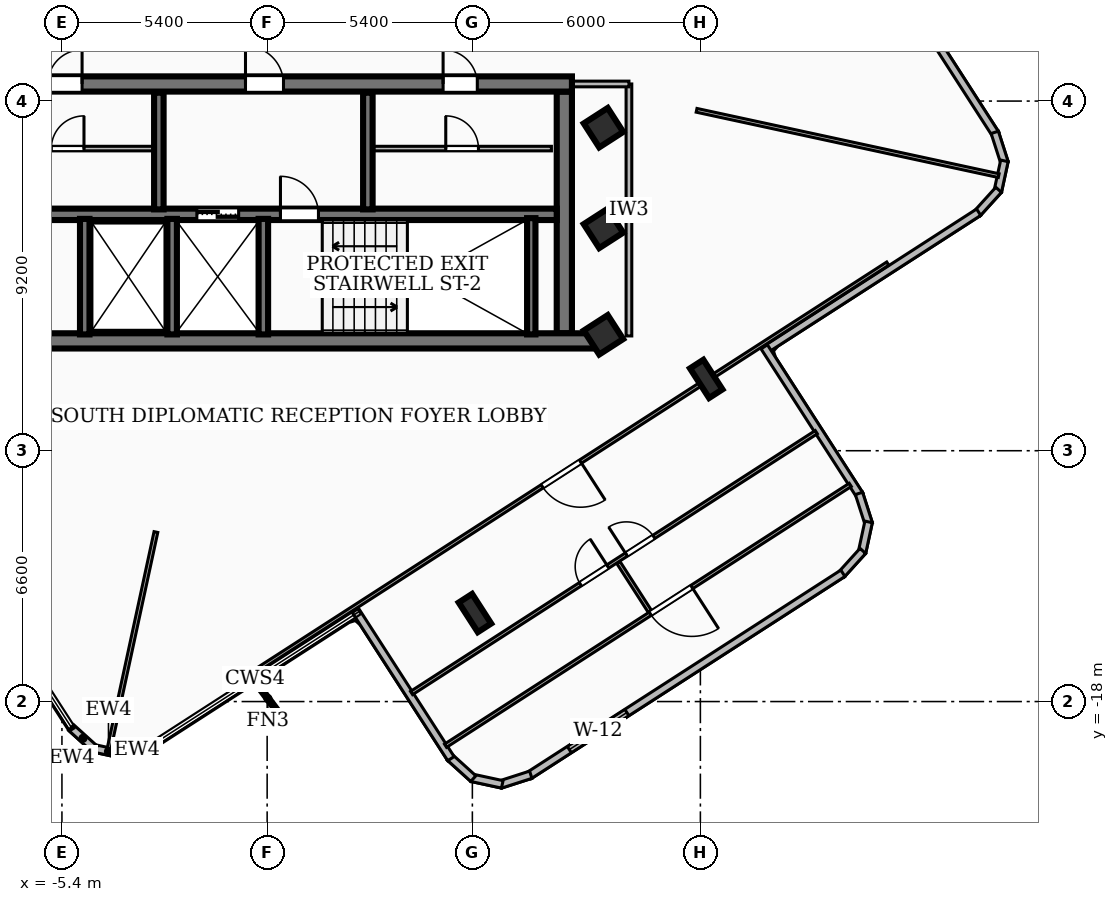
"""IFC4 building model, lengths in metres.
Left out: names, types, materials, properties, quantities, classifications, styles, units other than length and angle.
Written with IfcOpenShell. Run it as: python <this file> out.ifc"""

import sys

from ifc_helpers import new_model, si_unit, direction, frame, frame_2d, origin, origin_2d, place, context, subcontext, project, spatial, rectangle, i_section, extrude, element, fill, save


model = new_model("IFC4")
c1 = context("Model", 3, precision=1e-05, world=origin(), true_north=direction((0.0, 1.0)))
c2 = subcontext(c1, "Body", "Model", "MODEL_VIEW")
j1 = project(units=[si_unit("LENGTHUNIT", "METRE"), si_unit("PLANEANGLEUNIT", "RADIAN")], contexts=[c1])
p1 = place(None, origin())
s1 = spatial("IfcSite", under=j1, at=p1, CompositionType="ELEMENT")
p2 = place(p1, origin())
s2 = spatial("IfcBuilding", under=s1, at=p2, CompositionType="ELEMENT")
p3 = place(p2, frame((0.0, 0.0, 215.46)))
s3 = spatial("IfcBuildingStorey", under=s2, at=p3, CompositionType="ELEMENT", Elevation=215.46)
p4 = place(p3, frame((8.78, -8.51, 0.0), z_axis=(0.0, 0.0, 1.0), x_axis=(-1.0, 0.0, 0.0)))
e1 = element("IfcWall", 1, at=p4, inside=s3, PredefinedType="SHEAR", context=c2, shape_type="SweptSolid", body=[
    extrude(rectangle(XDim=17.56, YDim=0.4, at=frame_2d((8.78, 0.0))), origin(), (0.0, 0.0, 1.0), 3.16),
])
p5 = place(p3, frame((-8.02, -1.75, 0.0), z_axis=(0.0, 0.0, 1.0), x_axis=(1.0, 0.0, 0.0)))
e2 = element("IfcWall", 2, at=p5, inside=s3, PredefinedType="SHEAR", context=c2, shape_type="SweptSolid", body=[
    extrude(rectangle(XDim=16.04, YDim=0.4, at=frame_2d((8.02, 0.0))), origin(), (0.0, 0.0, 1.0), 3.16),
])
p6 = place(p5, frame((7.45, 0.0, 0.0)))
e3 = element("IfcOpeningElement", 3, at=p6, cuts=e2, PredefinedType="OPENING", context=c2, shape_type="SweptSolid", body=[
    extrude(rectangle(XDim=1.0, YDim=2.1, at=frame_2d((0.5, 1.05))), frame((0.0, 0.21, 0.0), z_axis=(0.0, -1.0, 0.0), x_axis=(1.0, 0.0, 0.0)), (0.0, 0.0, 1.0), 0.42),
])
p7 = place(p5, frame((12.65, 0.0, 0.0)))
e4 = element("IfcOpeningElement", 4, at=p7, cuts=e2, PredefinedType="OPENING", context=c2, shape_type="SweptSolid", body=[
    extrude(rectangle(XDim=0.9, YDim=2.06, at=frame_2d((0.45, 1.03))), frame((0.0, 0.21, 0.0), z_axis=(0.0, -1.0, 0.0), x_axis=(1.0, 0.0, 0.0)), (0.0, 0.0, 1.0), 0.42),
])
p8 = place(p5, frame((2.25, 0.0, 0.0)))
e5 = element("IfcOpeningElement", 5, at=p8, cuts=e2, PredefinedType="OPENING", context=c2, shape_type="SweptSolid", body=[
    extrude(rectangle(XDim=0.9, YDim=2.06, at=frame_2d((0.45, 1.03))), frame((0.0, 0.21, 0.0), z_axis=(0.0, -1.0, 0.0), x_axis=(1.0, 0.0, 0.0)), (0.0, 0.0, 1.0), 0.42),
])
p9 = place(p3, frame((7.82, -1.95, 0.0), z_axis=(0.0, 0.0, 1.0), x_axis=(0.0, -1.0, 0.0)))
e6 = element("IfcWall", 6, at=p9, inside=s3, PredefinedType="SHEAR", context=c2, shape_type="SweptSolid", body=[
    extrude(rectangle(XDim=6.36, YDim=0.4, at=frame_2d((3.18, 0.0))), origin(), (0.0, 0.0, 1.0), 3.16),
])
p10 = place(p3, frame((-7.62, -5.18, 0.0), z_axis=(0.0, 0.0, 1.0), x_axis=(1.0, 0.0, 0.0)))
e7 = element("IfcWall", 7, at=p10, inside=s3, PredefinedType="SOLIDWALL", context=c2, shape_type="SweptSolid", body=[
    extrude(rectangle(XDim=15.24, YDim=0.3, at=frame_2d((7.62, 0.0))), origin(), (0.0, 0.0, 1.0), 3.16),
])
p11 = place(p10, frame((5.77, 0.0, 0.0)))
e8 = element("IfcOpeningElement", 8, at=p11, cuts=e7, PredefinedType="OPENING", context=c2, shape_type="SweptSolid", body=[
    extrude(rectangle(XDim=1.1, YDim=2.15, at=frame_2d((0.55, 1.075))), frame((0.0, 0.16, 0.0), z_axis=(0.0, -1.0, 0.0), x_axis=(1.0, 0.0, 0.0)), (0.0, 0.0, 1.0), 0.32),
])
p12 = place(p10, frame((7.97, 0.0, 0.0)))
e9 = element("IfcOpeningElement", 9, at=p12, cuts=e7, PredefinedType="OPENING", context=c2, shape_type="SweptSolid", body=[
    extrude(rectangle(XDim=1.0, YDim=2.1, at=frame_2d((0.5, 1.05))), frame((0.0, 0.16, 0.0), z_axis=(0.0, -1.0, 0.0), x_axis=(1.0, 0.0, 0.0)), (0.0, 0.0, 1.0), 0.32),
])
p13 = place(p3, frame((6.95, -8.34, 0.0), z_axis=(0.0, 0.0, 1.0), x_axis=(0.0, 1.0, 0.0)))
e10 = element("IfcWall", 10, at=p13, inside=s3, PredefinedType="SOLIDWALL", context=c2, shape_type="SweptSolid", body=[
    extrude(rectangle(XDim=3.06, YDim=0.22, at=frame_2d((1.53, 0.0))), origin(), (0.0, 0.0, 1.0), 3.16),
])
for number, where, z_axis, x_axis in (
    (11, (-0.1, -8.34, 0.0), (0.0, 0.0, 1.0), (0.0, 1.0, 0.0)),
    (12, (-2.5, -8.34, 0.0), (0.0, 0.0, 1.0), (0.0, 1.0, 0.0)),
    (13, (-4.8, -8.34, 0.0), (0.0, 0.0, 1.0), (0.0, 1.0, 0.0)),
):
    element("IfcWall", number, at=place(p3, frame(where, z_axis=z_axis, x_axis=x_axis)), inside=s3, PredefinedType="SOLIDWALL", context=c2, shape_type="SweptSolid", body=[
        extrude(rectangle(XDim=3.04, YDim=0.25, at=frame_2d((1.52, 0.0))), origin(), (0.0, 0.0, 1.0), 3.16),
    ])
for number, where, z_axis, x_axis in (
    (14, (-2.85, -5.05, 0.0), (0.0, 0.0, 1.0), (0.0, 1.0, 0.0)),
    (15, (2.65, -5.05, 0.0), (0.0, 0.0, 1.0), (0.0, 1.0, 0.0)),
):
    element("IfcWall", number, at=place(p3, frame(where, z_axis=z_axis, x_axis=x_axis)), inside=s3, PredefinedType="SOLIDWALL", context=c2, shape_type="SweptSolid", body=[
        extrude(rectangle(XDim=3.07, YDim=0.25, at=frame_2d((1.535, 0.0))), origin(), (0.0, 0.0, 1.0), 3.16),
    ])
for number, where, z_axis, x_axis in (
    (16, (8.85, -5.55, 0.0), (0.0, 0.0, 1.0), (0.841, 0.542, 0.0)),
    (17, (8.85, -2.9, 0.0), (0.0, 0.0, 1.0), (0.841, 0.542, 0.0)),
    (18, (8.85, -8.35, 0.0), (0.0, 0.0, 1.0), (0.841, 0.542, 0.0)),
):
    element("IfcColumn", number, at=place(p3, frame(where, z_axis=z_axis, x_axis=x_axis)), inside=s3, PredefinedType="COLUMN", context=c2, shape_type="SweptSolid", body=[
        extrude(rectangle(XDim=0.75, YDim=0.75, at=origin_2d()), origin(), (0.0, 0.0, 1.0), 3.42),
    ])
for number, where, z_axis, x_axis in (
    (19, (5.468, -15.671, 0.0), (0.0, 0.0, 1.0), (0.841, 0.542, 0.0)),
    (20, (11.554, -9.51, 0.0), (0.0, 0.0, 1.0), (0.841, 0.542, 0.0)),
):
    element("IfcColumn", number, at=place(p3, frame(where, z_axis=z_axis, x_axis=x_axis)), inside=s3, PredefinedType="COLUMN", context=c2, shape_type="SweptSolid", body=[
        extrude(i_section(OverallWidth=0.418, OverallDepth=0.927, WebThickness=0.019, FlangeThickness=0.032, at=origin_2d()), origin(), (0.0, 0.0, 1.0), 3.42),
    ])
p14 = place(p3, frame((-3.023, -19.146, 0.0), z_axis=(0.0, 0.0, 1.0), x_axis=(-0.951837516142, -0.306602907463, 0.0)))
e21 = element("IfcWall", 21, at=p14, inside=s3, PredefinedType="SOLIDWALL", context=c2, shape_type="SweptSolid", body=[
    extrude(rectangle(XDim=0.838, YDim=0.2, at=frame_2d((0.419, 0.0))), origin(), (0.0, 0.0, 1.0), 3.16),
])
p15 = place(p3, frame((-3.773, -19.4, 0.0), z_axis=(0.0, 0.0, 1.0), x_axis=(-0.977467098281, 0.211087829535, 0.0)))
e22 = element("IfcWall", 22, at=p15, inside=s3, PredefinedType="SOLIDWALL", context=c2, shape_type="SweptSolid", body=[
    extrude(rectangle(XDim=0.823, YDim=0.2, at=frame_2d((0.412, 0.0))), origin(), (0.0, 0.0, 1.0), 3.16),
])
p16 = place(p3, frame((-4.535, -19.248, 0.0), z_axis=(0.0, 0.0, 1.0), x_axis=(-0.741439258983, 0.671019988703, 0.0)))
e23 = element("IfcWall", 23, at=p16, inside=s3, PredefinedType="SOLIDWALL", context=c2, shape_type="SweptSolid", body=[
    extrude(rectangle(XDim=0.839, YDim=0.2, at=frame_2d((0.419, 0.0))), origin(), (0.0, 0.0, 1.0), 3.16),
])
p17 = place(p3, frame((15.624, 2.431, 0.0), z_axis=(0.0, 0.0, 1.0), x_axis=(0.541715396451, -0.840561972283, 0.0)))
e24 = element("IfcWall", 24, at=p17, inside=s3, PredefinedType="SOLIDWALL", context=c2, shape_type="SweptSolid", body=[
    extrude(rectangle(XDim=6.542, YDim=0.2, at=frame_2d((3.271, 0.0))), origin(), (0.0, 0.0, 1.0), 3.16),
])
p18 = place(p3, frame((19.146, -3.023, 0.0), z_axis=(0.0, 0.0, 1.0), x_axis=(0.306602907463, -0.951837516142, 0.0)))
e25 = element("IfcWall", 25, at=p18, inside=s3, PredefinedType="SOLIDWALL", context=c2, shape_type="SweptSolid", body=[
    extrude(rectangle(XDim=0.838, YDim=0.2, at=frame_2d((0.419, 0.0))), origin(), (0.0, 0.0, 1.0), 3.16),
])
p19 = place(p3, frame((19.4, -3.773, 0.0), z_axis=(0.0, 0.0, 1.0), x_axis=(-0.211087829535, -0.977467098281, 0.0)))
e26 = element("IfcWall", 26, at=p19, inside=s3, PredefinedType="SOLIDWALL", context=c2, shape_type="SweptSolid", body=[
    extrude(rectangle(XDim=0.823, YDim=0.2, at=frame_2d((0.412, 0.0))), origin(), (0.0, 0.0, 1.0), 3.16),
])
p20 = place(p3, frame((19.248, -4.535, 0.0), z_axis=(0.0, 0.0, 1.0), x_axis=(-0.671019988703, -0.741439258983, 0.0)))
e27 = element("IfcWall", 27, at=p20, inside=s3, PredefinedType="SOLIDWALL", context=c2, shape_type="SweptSolid", body=[
    extrude(rectangle(XDim=0.839, YDim=0.2, at=frame_2d((0.419, 0.0))), origin(), (0.0, 0.0, 1.0), 3.16),
])
p21 = place(p3, frame((18.723, -5.124, 0.0), z_axis=(0.0, 0.0, 1.0), x_axis=(-0.840584959151, -0.541679726821, 0.0)))
e28 = element("IfcWall", 28, at=p21, inside=s3, PredefinedType="SOLIDWALL", context=c2, shape_type="SweptSolid", body=[
    extrude(rectangle(XDim=6.742, YDim=0.2, at=frame_2d((3.371, 0.0))), origin(), (0.0, 0.0, 1.0), 3.16),
])
p22 = place(p3, frame((13.08, -8.666, 0.0), z_axis=(0.0, 0.0, 1.0), x_axis=(0.541732711374, -0.840550813114, 0.0)))
e29 = element("IfcWall", 29, at=p22, inside=s3, PredefinedType="SOLIDWALL", context=c2, shape_type="SweptSolid", body=[
    extrude(rectangle(XDim=4.642, YDim=0.2, at=frame_2d((2.321, 0.0))), origin(), (0.0, 0.0, 1.0), 3.16),
])
p23 = place(p3, frame((15.573, -12.523, 0.0), z_axis=(0.0, 0.0, 1.0), x_axis=(0.306602907463, -0.951837516142, 0.0)))
e30 = element("IfcWall", 30, at=p23, inside=s3, PredefinedType="SOLIDWALL", context=c2, shape_type="SweptSolid", body=[
    extrude(rectangle(XDim=0.838, YDim=0.2, at=frame_2d((0.419, 0.0))), origin(), (0.0, 0.0, 1.0), 3.16),
])
p24 = place(p3, frame((15.827, -13.273, 0.0), z_axis=(0.0, 0.0, 1.0), x_axis=(-0.210782404691, -0.977533006027, 0.0)))
e31 = element("IfcWall", 31, at=p24, inside=s3, PredefinedType="SOLIDWALL", context=c2, shape_type="SweptSolid", body=[
    extrude(rectangle(XDim=0.825, YDim=0.2, at=frame_2d((0.412, 0.0))), origin(), (0.0, 0.0, 1.0), 3.16),
])
p25 = place(p3, frame((15.675, -14.036, 0.0), z_axis=(0.0, 0.0, 1.0), x_axis=(-0.671019988703, -0.741439258983, 0.0)))
e32 = element("IfcWall", 32, at=p25, inside=s3, PredefinedType="SOLIDWALL", context=c2, shape_type="SweptSolid", body=[
    extrude(rectangle(XDim=0.839, YDim=0.2, at=frame_2d((0.419, 0.0))), origin(), (0.0, 0.0, 1.0), 3.16),
])
p26 = place(p3, frame((15.15, -14.625, 0.0), z_axis=(0.0, 0.0, 1.0), x_axis=(-0.84055619882, -0.541724354839, 0.0)))
e33 = element("IfcWall", 33, at=p26, inside=s3, PredefinedType="SOLIDWALL", context=c2, shape_type="SweptSolid", body=[
    extrude(rectangle(XDim=9.824, YDim=0.2, at=frame_2d((4.912, 0.0))), origin(), (0.0, 0.0, 1.0), 3.16),
])
p27 = place(p26, frame((6.763, 0.0, 0.85)))
e34 = element("IfcOpeningElement", 34, at=p27, cuts=e33, PredefinedType="OPENING", context=c2, shape_type="SweptSolid", body=[
    extrude(rectangle(XDim=1.8, YDim=1.6, at=frame_2d((0.9, 0.8))), frame((0.0, 0.11, 0.0), z_axis=(0.0, -1.0, 0.0), x_axis=(1.0, 0.0, 0.0)), (0.0, 0.0, 1.0), 0.22),
])
p28 = place(p3, frame((6.937, -19.925, 0.0), z_axis=(0.0, 0.0, 1.0), x_axis=(-0.951922461344, -0.306339072907, 0.0)))
e35 = element("IfcWall", 35, at=p28, inside=s3, PredefinedType="SOLIDWALL", context=c2, shape_type="SweptSolid", body=[
    extrude(rectangle(XDim=0.838, YDim=0.2, at=frame_2d((0.419, 0.0))), origin(), (0.0, 0.0, 1.0), 3.16),
])
p29 = place(p3, frame((6.187, -20.179, 0.0), z_axis=(0.0, 0.0, 1.0), x_axis=(-0.977405889656, 0.211371064399, 0.0)))
e36 = element("IfcWall", 36, at=p29, inside=s3, PredefinedType="SOLIDWALL", context=c2, shape_type="SweptSolid", body=[
    extrude(rectangle(XDim=0.823, YDim=0.2, at=frame_2d((0.412, 0.0))), origin(), (0.0, 0.0, 1.0), 3.16),
])
p30 = place(p3, frame((5.425, -20.027, 0.0), z_axis=(0.0, 0.0, 1.0), x_axis=(-0.741439258983, 0.671019988703, 0.0)))
e37 = element("IfcWall", 37, at=p30, inside=s3, PredefinedType="SOLIDWALL", context=c2, shape_type="SweptSolid", body=[
    extrude(rectangle(XDim=0.839, YDim=0.2, at=frame_2d((0.419, 0.0))), origin(), (0.0, 0.0, 1.0), 3.16),
])
p31 = place(p3, frame((4.836, -19.502, 0.0), z_axis=(0.0, 0.0, 1.0), x_axis=(-0.541756659411, 0.840535378187, 0.0)))
e38 = element("IfcWall", 38, at=p31, inside=s3, PredefinedType="SOLIDWALL", context=c2, shape_type="SweptSolid", body=[
    extrude(rectangle(XDim=4.642, YDim=0.2, at=frame_2d((2.321, 0.0))), origin(), (0.0, 0.0, 1.0), 3.16),
])
p32 = place(p3, frame((2.8, -3.45, 0.0), z_axis=(0.0, 0.0, 1.0), x_axis=(1.0, 0.0, 0.0)))
e39 = element("IfcWall", 39, at=p32, inside=s3, PredefinedType="PARTITIONING", context=c2, shape_type="SweptSolid", body=[
    extrude(rectangle(XDim=4.68, YDim=0.12, at=frame_2d((2.34, 0.0))), origin(), (0.0, 0.0, 1.0), 3.16),
])
p33 = place(p32, frame((1.9, 0.0, 0.0)))
e40 = element("IfcOpeningElement", 40, at=p33, cuts=e39, PredefinedType="OPENING", context=c2, shape_type="SweptSolid", body=[
    extrude(rectangle(XDim=0.86, YDim=2.04, at=frame_2d((0.43, 1.02))), frame((0.0, 0.07, 0.0), z_axis=(0.0, -1.0, 0.0), x_axis=(1.0, 0.0, 0.0)), (0.0, 0.0, 1.0), 0.14),
])
p34 = place(p3, frame((-7.52, -3.45, 0.0), z_axis=(0.0, 0.0, 1.0), x_axis=(1.0, 0.0, 0.0)))
e41 = element("IfcWall", 41, at=p34, inside=s3, PredefinedType="PARTITIONING", context=c2, shape_type="SweptSolid", body=[
    extrude(rectangle(XDim=4.54, YDim=0.12, at=frame_2d((2.27, 0.0))), origin(), (0.0, 0.0, 1.0), 3.16),
])
p35 = place(p34, frame((1.84, 0.0, 0.0)))
e42 = element("IfcOpeningElement", 42, at=p35, cuts=e41, PredefinedType="OPENING", context=c2, shape_type="SweptSolid", body=[
    extrude(rectangle(XDim=0.86, YDim=2.04, at=frame_2d((0.43, 1.02))), frame((0.0, 0.07, 0.0), z_axis=(0.0, -1.0, 0.0), x_axis=(1.0, 0.0, 0.0)), (0.0, 0.0, 1.0), 0.14),
])
p36 = place(p3, frame((9.52, -8.38, 0.0), z_axis=(0.0, 0.0, 1.0), x_axis=(0.0, 1.0, 0.0)))
e43 = element("IfcWall", 43, at=p36, inside=s3, PredefinedType="PARTITIONING", context=c2, shape_type="SweptSolid", body=[
    extrude(rectangle(XDim=6.63, YDim=0.15, at=frame_2d((3.315, 0.0))), origin(), (0.0, 0.0, 1.0), 3.16),
])
p37 = place(p3, frame((7.85, -1.75, 0.0), z_axis=(0.0, 0.0, 1.0), x_axis=(1.0, 0.0, 0.0)))
e44 = element("IfcWall", 44, at=p37, inside=s3, PredefinedType="PARTITIONING", context=c2, shape_type="SweptSolid", body=[
    extrude(rectangle(XDim=1.67, YDim=0.15, at=frame_2d((0.835, 0.0))), origin(), (0.0, 0.0, 1.0), 2.39),
])
p38 = place(p3, frame((-2.927, -13.54, 0.0), z_axis=(0.0, 0.0, 1.0), x_axis=(-0.21141803497, -0.977395730751, 0.0)))
e45 = element("IfcWall", 45, at=p38, inside=s3, PredefinedType="PARTITIONING", context=c2, shape_type="SweptSolid", body=[
    extrude(rectangle(XDim=5.842, YDim=0.1, at=frame_2d((2.921, 0.0))), origin(), (0.0, 0.0, 1.0), 3.16),
])
p39 = place(p3, frame((11.3, -2.443, 0.0), z_axis=(0.0, 0.0, 1.0), x_axis=(0.977411986974, -0.211342867681, 0.0)))
e46 = element("IfcWall", 46, at=p39, inside=s3, PredefinedType="PARTITIONING", context=c2, shape_type="SweptSolid", body=[
    extrude(rectangle(XDim=8.134, YDim=0.1, at=frame_2d((4.067, 0.0))), origin(), (0.0, 0.0, 1.0), 3.16),
])
p40 = place(p3, frame((16.331, -6.476, 0.0), z_axis=(0.0, 0.0, 1.0), x_axis=(-0.840579457381, -0.541688264437, 0.0)))
e47 = element("IfcWall", 47, at=p40, inside=s3, PredefinedType="PARTITIONING", context=c2, shape_type="SweptSolid", body=[
    extrude(rectangle(XDim=20.238, YDim=0.1, at=frame_2d((10.119, 0.0))), origin(), (0.0, 0.0, 1.0), 2.53),
])
p41 = place(p40, frame((9.619, 0.0, 0.0)))
e48 = element("IfcOpeningElement", 48, at=p41, cuts=e47, PredefinedType="OPENING", context=c2, shape_type="SweptSolid", body=[
    extrude(rectangle(XDim=1.2, YDim=2.1, at=frame_2d((0.6, 1.05))), frame((0.0, 0.06, 0.0), z_axis=(0.0, -1.0, 0.0), x_axis=(1.0, 0.0, 0.0)), (0.0, 0.0, 1.0), 0.12),
])
p42 = place(p3, frame((9.242, -14.34, 0.0), z_axis=(0.0, 0.0, 1.0), x_axis=(0.541443159102, -0.840737358193, 0.0)))
e49 = element("IfcWall", 49, at=p42, inside=s3, PredefinedType="PARTITIONING", context=c2, shape_type="SweptSolid", body=[
    extrude(rectangle(XDim=1.53, YDim=0.1, at=frame_2d((0.765, 0.0))), origin(), (0.0, 0.0, 1.0), 3.16),
])
p43 = place(p3, frame((3.8, -17.775, 0.0), z_axis=(0.0, 0.0, 1.0), x_axis=(0.840588193286, 0.54167470802, 0.0)))
e50 = element("IfcWall", 50, at=p43, inside=s3, PredefinedType="PARTITIONING", context=c2, shape_type="SweptSolid", body=[
    extrude(rectangle(XDim=12.67, YDim=0.1, at=frame_2d((6.335, 0.0))), origin(), (0.0, 0.0, 1.0), 3.16),
])
p44 = place(p43, frame((5.285, 0.0, 0.0)))
e51 = element("IfcOpeningElement", 51, at=p44, cuts=e50, PredefinedType="OPENING", context=c2, shape_type="SweptSolid", body=[
    extrude(rectangle(XDim=0.86, YDim=2.04, at=frame_2d((0.43, 1.02))), frame((0.0, 0.06, 0.0), z_axis=(0.0, -1.0, 0.0), x_axis=(1.0, 0.0, 0.0)), (0.0, 0.0, 1.0), 0.12),
])
p45 = place(p43, frame((6.725, 0.0, 0.0)))
e52 = element("IfcOpeningElement", 52, at=p45, cuts=e50, PredefinedType="OPENING", context=c2, shape_type="SweptSolid", body=[
    extrude(rectangle(XDim=0.86, YDim=2.04, at=frame_2d((0.43, 1.02))), frame((0.0, 0.06, 0.0), z_axis=(0.0, -1.0, 0.0), x_axis=(1.0, 0.0, 0.0)), (0.0, 0.0, 1.0), 0.12),
])
p46 = place(p3, frame((15.344, -12.299, 0.0), z_axis=(0.0, 0.0, 1.0), x_axis=(-0.840579419228, -0.541688323642, 0.0)))
e53 = element("IfcWall", 53, at=p46, inside=s3, PredefinedType="PARTITIONING", context=c2, shape_type="SweptSolid", body=[
    extrude(rectangle(XDim=12.67, YDim=0.1, at=frame_2d((6.335, 0.0))), origin(), (0.0, 0.0, 1.0), 3.16),
])
p47 = place(p46, frame((4.96, 0.0, 0.0)))
e54 = element("IfcOpeningElement", 54, at=p47, cuts=e53, PredefinedType="OPENING", context=c2, shape_type="SweptSolid", body=[
    extrude(rectangle(XDim=1.3, YDim=2.1, at=frame_2d((0.65, 1.05))), frame((0.0, 0.06, 0.0), z_axis=(0.0, -1.0, 0.0), x_axis=(1.0, 0.0, 0.0)), (0.0, 0.0, 1.0), 0.12),
])
p48 = place(p27, origin())
e55 = element("IfcWindow", 55, at=p48, inside=s3, PartitioningType="SINGLE_PANEL", PredefinedType="WINDOW", context=c2, shape_type="SweptSolid", body=[
    extrude(rectangle(XDim=1.8, YDim=1.6, at=frame_2d((0.9, 0.8))), frame((0.0, 0.03, 0.0), z_axis=(0.0, -1.0, 0.0), x_axis=(1.0, 0.0, 0.0)), (0.0, 0.0, 1.0), 0.06),
])
fill(e34, e55)
p49 = place(p6, origin())
e56 = element("IfcDoor", 56, at=p49, inside=s3, OperationType="SINGLE_SWING_LEFT", PredefinedType="DOOR", context=c2, shape_type="SweptSolid", body=[
    extrude(rectangle(XDim=1.0, YDim=2.1, at=frame_2d((0.5, 1.05))), frame((0.0, 0.025, 0.0), z_axis=(0.0, -1.0, 0.0), x_axis=(1.0, 0.0, 0.0)), (0.0, 0.0, 1.0), 0.05),
])
fill(e3, e56)
p50 = place(p11, origin())
e57 = element("IfcDoor", 57, at=p50, inside=s3, OperationType="DOUBLE_DOOR_SLIDING", PredefinedType="DOOR", context=c2, shape_type="SweptSolid", body=[
    extrude(rectangle(XDim=1.1, YDim=2.15, at=frame_2d((0.55, 1.075))), frame((0.0, 0.025, 0.0), z_axis=(0.0, -1.0, 0.0), x_axis=(1.0, 0.0, 0.0)), (0.0, 0.0, 1.0), 0.05),
])
fill(e8, e57)
p51 = place(p12, origin())
e58 = element("IfcDoor", 58, at=p51, inside=s3, OperationType="SINGLE_SWING_LEFT", PredefinedType="DOOR", context=c2, shape_type="SweptSolid", body=[
    extrude(rectangle(XDim=1.0, YDim=2.1, at=frame_2d((0.5, 1.05))), frame((0.0, 0.025, 0.0), z_axis=(0.0, -1.0, 0.0), x_axis=(1.0, 0.0, 0.0)), (0.0, 0.0, 1.0), 0.05),
])
fill(e9, e58)
p52 = place(p7, origin())
e59 = element("IfcDoor", 59, at=p52, inside=s3, OperationType="SINGLE_SWING_LEFT", PredefinedType="DOOR", context=c2, shape_type="SweptSolid", body=[
    extrude(rectangle(XDim=0.9, YDim=2.06, at=frame_2d((0.45, 1.03))), frame((0.0, 0.025, 0.0), z_axis=(0.0, -1.0, 0.0), x_axis=(1.0, 0.0, 0.0)), (0.0, 0.0, 1.0), 0.05),
])
fill(e4, e59)
p53 = place(p8, origin())
e60 = element("IfcDoor", 60, at=p53, inside=s3, OperationType="SINGLE_SWING_RIGHT", PredefinedType="DOOR", context=c2, shape_type="SweptSolid", body=[
    extrude(rectangle(XDim=0.9, YDim=2.06, at=frame_2d((0.45, 1.03))), frame((0.0, 0.025, 0.0), z_axis=(0.0, -1.0, 0.0), x_axis=(1.0, 0.0, 0.0)), (0.0, 0.0, 1.0), 0.05),
])
fill(e5, e60)
p54 = place(p33, origin())
e61 = element("IfcDoor", 61, at=p54, inside=s3, OperationType="SINGLE_SWING_LEFT", PredefinedType="DOOR", context=c2, shape_type="SweptSolid", body=[
    extrude(rectangle(XDim=0.86, YDim=2.04, at=frame_2d((0.43, 1.02))), frame((0.0, 0.025, 0.0), z_axis=(0.0, -1.0, 0.0), x_axis=(1.0, 0.0, 0.0)), (0.0, 0.0, 1.0), 0.05),
])
fill(e40, e61)
p55 = place(p35, origin())
e62 = element("IfcDoor", 62, at=p55, inside=s3, OperationType="SINGLE_SWING_RIGHT", PredefinedType="DOOR", context=c2, shape_type="SweptSolid", body=[
    extrude(rectangle(XDim=0.86, YDim=2.04, at=frame_2d((0.43, 1.02))), frame((0.0, 0.025, 0.0), z_axis=(0.0, -1.0, 0.0), x_axis=(1.0, 0.0, 0.0)), (0.0, 0.0, 1.0), 0.05),
])
fill(e42, e62)
p56 = place(p41, origin())
e63 = element("IfcDoor", 63, at=p56, inside=s3, OperationType="SINGLE_SWING_LEFT", PredefinedType="DOOR", context=c2, shape_type="SweptSolid", body=[
    extrude(rectangle(XDim=1.2, YDim=2.1, at=frame_2d((0.6, 1.05))), frame((0.0, 0.025, 0.0), z_axis=(0.0, -1.0, 0.0), x_axis=(1.0, 0.0, 0.0)), (0.0, 0.0, 1.0), 0.05),
])
fill(e48, e63)
p57 = place(p44, origin())
e64 = element("IfcDoor", 64, at=p57, inside=s3, OperationType="SINGLE_SWING_RIGHT", PredefinedType="DOOR", context=c2, shape_type="SweptSolid", body=[
    extrude(rectangle(XDim=0.86, YDim=2.04, at=frame_2d((0.43, 1.02))), frame((0.0, 0.025, 0.0), z_axis=(0.0, -1.0, 0.0), x_axis=(1.0, 0.0, 0.0)), (0.0, 0.0, 1.0), 0.05),
])
fill(e51, e64)
p58 = place(p45, origin())
e65 = element("IfcDoor", 65, at=p58, inside=s3, OperationType="SINGLE_SWING_LEFT", PredefinedType="DOOR", context=c2, shape_type="SweptSolid", body=[
    extrude(rectangle(XDim=0.86, YDim=2.04, at=frame_2d((0.43, 1.02))), frame((0.0, 0.025, 0.0), z_axis=(0.0, -1.0, 0.0), x_axis=(1.0, 0.0, 0.0)), (0.0, 0.0, 1.0), 0.05),
])
fill(e52, e65)
p59 = place(p47, origin())
e66 = element("IfcDoor", 66, at=p59, inside=s3, OperationType="SINGLE_SWING_LEFT", PredefinedType="DOOR", context=c2, shape_type="SweptSolid", body=[
    extrude(rectangle(XDim=1.3, YDim=2.1, at=frame_2d((0.65, 1.05))), frame((0.0, 0.025, 0.0), z_axis=(0.0, -1.0, 0.0), x_axis=(1.0, 0.0, 0.0)), (0.0, 0.0, 1.0), 0.05),
])
fill(e54, e66)
save(model, sys.argv[1])
